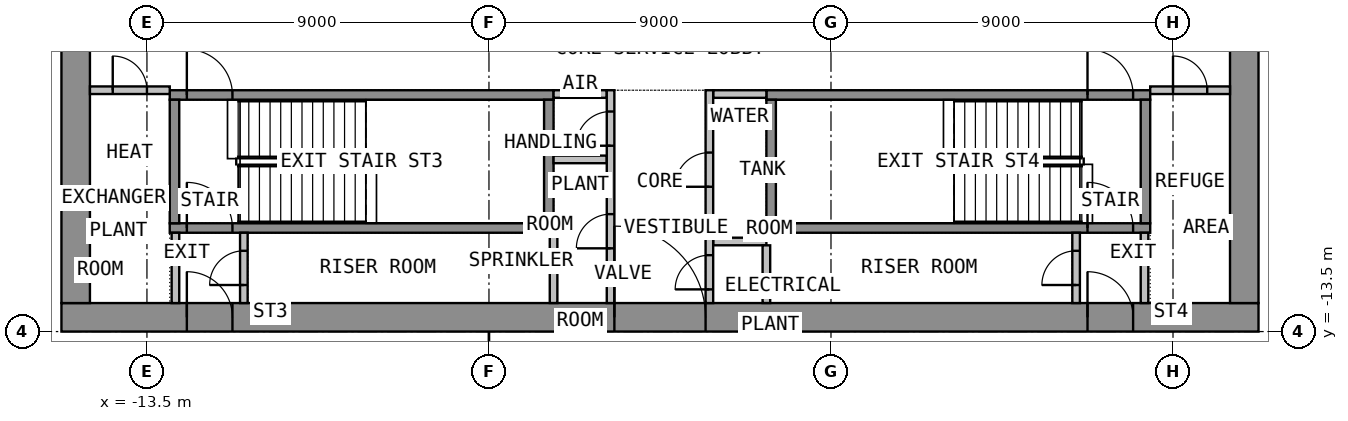
"""IFC4 building model, lengths in metres.
Left out: names, types, materials, properties, quantities, classifications, styles, units other than length and angle.
Written with IfcOpenShell. Run it as: python <this file> out.ifc"""

import sys

from ifc_helpers import new_model, si_unit, direction, frame, frame_2d, origin, place, context, subcontext, project, spatial, rectangle, extrude, element, fill, save


model = new_model("IFC4")
c1 = context("Model", 3, precision=1e-05, world=origin(), true_north=direction((0.0, 1.0)))
c2 = subcontext(c1, "Body", "Model", "MODEL_VIEW")
j1 = project(units=[si_unit("LENGTHUNIT", "METRE"), si_unit("PLANEANGLEUNIT", "RADIAN")], contexts=[c1])
p1 = place(None, origin())
s1 = spatial("IfcSite", under=j1, at=p1, CompositionType="ELEMENT")
p2 = place(p1, origin())
s2 = spatial("IfcBuilding", under=s1, at=p2, CompositionType="ELEMENT")
p3 = place(p2, frame((0.0, 0.0, 128.1)))
s3 = spatial("IfcBuildingStorey", under=s2, at=p3, CompositionType="ELEMENT", Elevation=128.1)
p4 = place(p3, frame((-15.75, -13.125, 0.0), z_axis=(0.0, 0.0, 1.0), x_axis=(1.0, 0.0, 0.0)))
e1 = element("IfcWall", 1, at=p4, inside=s3, PredefinedType="SHEAR", context=c2, shape_type="SweptSolid", body=[
    extrude(rectangle(XDim=31.5, YDim=0.75, at=frame_2d((15.75, 0.0))), origin(), (0.0, 0.0, 1.0), 4.175),
])
p5 = place(p4, frame((14.55, 0.0, 0.0)))
e2 = element("IfcOpeningElement", 2, at=p5, cuts=e1, PredefinedType="OPENING", context=c2, shape_type="SweptSolid", body=[
    extrude(rectangle(XDim=2.4, YDim=2.1, at=frame_2d((1.2, 1.05))), frame((0.0, 0.385, 0.0), z_axis=(0.0, -1.0, 0.0), x_axis=(1.0, 0.0, 0.0)), (0.0, 0.0, 1.0), 0.77),
])
p6 = place(p4, frame((3.3, 0.0, 0.0)))
e3 = element("IfcOpeningElement", 3, at=p6, cuts=e1, PredefinedType="OPENING", context=c2, shape_type="SweptSolid", body=[
    extrude(rectangle(XDim=1.2, YDim=2.1, at=frame_2d((0.6, 1.05))), frame((0.0, 0.385, 0.0), z_axis=(0.0, -1.0, 0.0), x_axis=(1.0, 0.0, 0.0)), (0.0, 0.0, 1.0), 0.77),
])
p7 = place(p4, frame((27.0, 0.0, 0.0)))
e4 = element("IfcOpeningElement", 4, at=p7, cuts=e1, PredefinedType="OPENING", context=c2, shape_type="SweptSolid", body=[
    extrude(rectangle(XDim=1.2, YDim=2.1, at=frame_2d((0.6, 1.05))), frame((0.0, 0.385, 0.0), z_axis=(0.0, -1.0, 0.0), x_axis=(1.0, 0.0, 0.0)), (0.0, 0.0, 1.0), 0.77),
])
p8 = place(p3, frame((-15.375, -12.75, 0.0), z_axis=(0.0, 0.0, 1.0), x_axis=(0.0, 1.0, 0.0)))
e5 = element("IfcWall", 5, at=p8, inside=s3, PredefinedType="SHEAR", context=c2, shape_type="SweptSolid", body=[
    extrude(rectangle(XDim=25.5, YDim=0.75, at=frame_2d((12.75, 0.0))), origin(), (0.0, 0.0, 1.0), 4.175),
])
p9 = place(p8, frame((11.55, 0.0, 0.0)))
e6 = element("IfcOpeningElement", 6, at=p9, cuts=e5, PredefinedType="OPENING", context=c2, shape_type="SweptSolid", body=[
    extrude(rectangle(XDim=2.4, YDim=2.1, at=frame_2d((1.2, 1.05))), frame((0.0, 0.385, 0.0), z_axis=(0.0, -1.0, 0.0), x_axis=(1.0, 0.0, 0.0)), (0.0, 0.0, 1.0), 0.77),
])
p10 = place(p3, frame((15.375, -12.75, 0.0), z_axis=(0.0, 0.0, 1.0), x_axis=(0.0, 1.0, 0.0)))
e7 = element("IfcWall", 7, at=p10, inside=s3, PredefinedType="SHEAR", context=c2, shape_type="SweptSolid", body=[
    extrude(rectangle(XDim=25.5, YDim=0.75, at=frame_2d((12.75, 0.0))), origin(), (0.0, 0.0, 1.0), 4.175),
])
p11 = place(p10, frame((11.55, 0.0, 0.0)))
e8 = element("IfcOpeningElement", 8, at=p11, cuts=e7, PredefinedType="OPENING", context=c2, shape_type="SweptSolid", body=[
    extrude(rectangle(XDim=2.4, YDim=2.1, at=frame_2d((1.2, 1.05))), frame((0.0, 0.385, 0.0), z_axis=(0.0, -1.0, 0.0), x_axis=(1.0, 0.0, 0.0)), (0.0, 0.0, 1.0), 0.77),
])
p12 = place(p3, frame((-12.9, -10.775, 0.0), z_axis=(0.0, 0.0, 1.0), x_axis=(1.0, 0.0, 0.0)))
e9 = element("IfcWall", 9, at=p12, inside=s3, PredefinedType="SHEAR", context=c2, shape_type="SweptSolid", body=[
    extrude(rectangle(XDim=10.1, YDim=0.25, at=frame_2d((5.05, 0.0))), origin(), (0.0, 0.0, 1.0), 4.175),
])
p13 = place(p12, frame((0.45, 0.0, 0.0)))
e10 = element("IfcOpeningElement", 10, at=p13, cuts=e9, PredefinedType="OPENING", context=c2, shape_type="SweptSolid", body=[
    extrude(rectangle(XDim=1.2, YDim=2.1, at=frame_2d((0.6, 1.05))), frame((0.0, 0.135, 0.0), z_axis=(0.0, -1.0, 0.0), x_axis=(1.0, 0.0, 0.0)), (0.0, 0.0, 1.0), 0.27),
])
p14 = place(p3, frame((-12.9, -7.275, 0.0), z_axis=(0.0, 0.0, 1.0), x_axis=(1.0, 0.0, 0.0)))
e11 = element("IfcWall", 11, at=p14, inside=s3, PredefinedType="SHEAR", context=c2, shape_type="SweptSolid", body=[
    extrude(rectangle(XDim=10.1, YDim=0.25, at=frame_2d((5.05, 0.0))), origin(), (0.0, 0.0, 1.0), 4.175),
])
p15 = place(p14, frame((0.45, 0.0, 0.0)))
e12 = element("IfcOpeningElement", 12, at=p15, cuts=e11, PredefinedType="OPENING", context=c2, shape_type="SweptSolid", body=[
    extrude(rectangle(XDim=1.2, YDim=2.1, at=frame_2d((0.6, 1.05))), frame((0.0, 0.135, 0.0), z_axis=(0.0, -1.0, 0.0), x_axis=(1.0, 0.0, 0.0)), (0.0, 0.0, 1.0), 0.27),
])
for number, where, z_axis, x_axis in (
    (13, (-12.775, -10.65, 0.0), (0.0, 0.0, 1.0), (0.0, 1.0, 0.0)),
    (14, (-2.925, -10.65, 0.0), (0.0, 0.0, 1.0), (0.0, 1.0, 0.0)),
):
    element("IfcWall", number, at=place(p3, frame(where, z_axis=z_axis, x_axis=x_axis)), inside=s3, PredefinedType="SHEAR", context=c2, shape_type="SweptSolid", body=[
        extrude(rectangle(XDim=3.25, YDim=0.25, at=frame_2d((1.625, 0.0))), origin(), (0.0, 0.0, 1.0), 4.175),
    ])
p16 = place(p3, frame((2.8, -10.775, 0.0), z_axis=(0.0, 0.0, 1.0), x_axis=(1.0, 0.0, 0.0)))
e15 = element("IfcWall", 15, at=p16, inside=s3, PredefinedType="SHEAR", context=c2, shape_type="SweptSolid", body=[
    extrude(rectangle(XDim=10.1, YDim=0.25, at=frame_2d((5.05, 0.0))), origin(), (0.0, 0.0, 1.0), 4.175),
])
p17 = place(p16, frame((8.45, 0.0, 0.0)))
e16 = element("IfcOpeningElement", 16, at=p17, cuts=e15, PredefinedType="OPENING", context=c2, shape_type="SweptSolid", body=[
    extrude(rectangle(XDim=1.2, YDim=2.1, at=frame_2d((0.6, 1.05))), frame((0.0, 0.135, 0.0), z_axis=(0.0, -1.0, 0.0), x_axis=(1.0, 0.0, 0.0)), (0.0, 0.0, 1.0), 0.27),
])
p18 = place(p3, frame((2.8, -7.275, 0.0), z_axis=(0.0, 0.0, 1.0), x_axis=(1.0, 0.0, 0.0)))
e17 = element("IfcWall", 17, at=p18, inside=s3, PredefinedType="SHEAR", context=c2, shape_type="SweptSolid", body=[
    extrude(rectangle(XDim=10.1, YDim=0.25, at=frame_2d((5.05, 0.0))), origin(), (0.0, 0.0, 1.0), 4.175),
])
p19 = place(p18, frame((8.45, 0.0, 0.0)))
e18 = element("IfcOpeningElement", 18, at=p19, cuts=e17, PredefinedType="OPENING", context=c2, shape_type="SweptSolid", body=[
    extrude(rectangle(XDim=1.2, YDim=2.1, at=frame_2d((0.6, 1.05))), frame((0.0, 0.135, 0.0), z_axis=(0.0, -1.0, 0.0), x_axis=(1.0, 0.0, 0.0)), (0.0, 0.0, 1.0), 0.27),
])
for number, where, z_axis, x_axis in (
    (19, (2.925, -10.65, 0.0), (0.0, 0.0, 1.0), (0.0, 1.0, 0.0)),
    (20, (12.775, -10.65, 0.0), (0.0, 0.0, 1.0), (0.0, 1.0, 0.0)),
):
    element("IfcWall", number, at=place(p3, frame(where, z_axis=z_axis, x_axis=x_axis)), inside=s3, PredefinedType="SHEAR", context=c2, shape_type="SweptSolid", body=[
        extrude(rectangle(XDim=3.25, YDim=0.25, at=frame_2d((1.625, 0.0))), origin(), (0.0, 0.0, 1.0), 4.175),
    ])
for number, where, z_axis, x_axis in (
    (21, (-2.8, -7.25, 0.0), (0.0, 0.0, 1.0), (1.0, 0.0, 0.0)),
    (22, (-2.8, -8.97, 0.0), (0.0, 0.0, 1.0), (1.0, 0.0, 0.0)),
    (23, (1.4, -7.25, 0.0), (0.0, 0.0, 1.0), (1.0, 0.0, 0.0)),
    (24, (1.4, -11.13, 0.0), (0.0, 0.0, 1.0), (1.0, 0.0, 0.0)),
):
    element("IfcWall", number, at=place(p3, frame(where, z_axis=z_axis, x_axis=x_axis)), inside=s3, PredefinedType="PARTITIONING", context=c2, shape_type="SweptSolid", body=[
        extrude(rectangle(XDim=1.4, YDim=0.2, at=frame_2d((0.7, 0.0))), origin(), (0.0, 0.0, 1.0), 4.175),
    ])
p20 = place(p3, frame((-1.3, -12.75, 0.0), z_axis=(0.0, 0.0, 1.0), x_axis=(0.0, 1.0, 0.0)))
e25 = element("IfcWall", 25, at=p20, inside=s3, PredefinedType="PARTITIONING", context=c2, shape_type="SweptSolid", body=[
    extrude(rectangle(XDim=5.6, YDim=0.2, at=frame_2d((2.8, 0.0))), origin(), (0.0, 0.0, 1.0), 4.175),
])
p21 = place(p20, frame((1.44, 0.0, 0.0)))
e26 = element("IfcOpeningElement", 26, at=p21, cuts=e25, PredefinedType="OPENING", context=c2, shape_type="SweptSolid", body=[
    extrude(rectangle(XDim=0.9, YDim=2.1, at=frame_2d((0.45, 1.05))), frame((0.0, 0.11, 0.0), z_axis=(0.0, -1.0, 0.0), x_axis=(1.0, 0.0, 0.0)), (0.0, 0.0, 1.0), 0.22),
])
p22 = place(p20, frame((4.14, 0.0, 0.0)))
e27 = element("IfcOpeningElement", 27, at=p22, cuts=e25, PredefinedType="OPENING", context=c2, shape_type="SweptSolid", body=[
    extrude(rectangle(XDim=0.9, YDim=2.1, at=frame_2d((0.45, 1.05))), frame((0.0, 0.11, 0.0), z_axis=(0.0, -1.0, 0.0), x_axis=(1.0, 0.0, 0.0)), (0.0, 0.0, 1.0), 0.22),
])
p23 = place(p3, frame((1.3, -12.75, 0.0), z_axis=(0.0, 0.0, 1.0), x_axis=(0.0, 1.0, 0.0)))
e28 = element("IfcWall", 28, at=p23, inside=s3, PredefinedType="PARTITIONING", context=c2, shape_type="SweptSolid", body=[
    extrude(rectangle(XDim=5.6, YDim=0.2, at=frame_2d((2.8, 0.0))), origin(), (0.0, 0.0, 1.0), 4.175),
])
p24 = place(p23, frame((0.36, 0.0, 0.0)))
e29 = element("IfcOpeningElement", 29, at=p24, cuts=e28, PredefinedType="OPENING", context=c2, shape_type="SweptSolid", body=[
    extrude(rectangle(XDim=0.9, YDim=2.1, at=frame_2d((0.45, 1.05))), frame((0.0, 0.11, 0.0), z_axis=(0.0, -1.0, 0.0), x_axis=(1.0, 0.0, 0.0)), (0.0, 0.0, 1.0), 0.22),
])
p25 = place(p23, frame((3.06, 0.0, 0.0)))
e30 = element("IfcOpeningElement", 30, at=p25, cuts=e28, PredefinedType="OPENING", context=c2, shape_type="SweptSolid", body=[
    extrude(rectangle(XDim=0.9, YDim=2.1, at=frame_2d((0.45, 1.05))), frame((0.0, 0.11, 0.0), z_axis=(0.0, -1.0, 0.0), x_axis=(1.0, 0.0, 0.0)), (0.0, 0.0, 1.0), 0.22),
])
p26 = place(p3, frame((-12.75, -12.75, 0.0), z_axis=(0.0, 0.0, 1.0), x_axis=(0.0, 1.0, 0.0)))
e31 = element("IfcWall", 31, at=p26, inside=s3, PredefinedType="PARTITIONING", context=c2, shape_type="SweptSolid", body=[
    extrude(rectangle(XDim=1.85, YDim=0.2, at=frame_2d((0.925, 0.0))), origin(), (0.0, 0.0, 1.0), 4.175),
])
p27 = place(p3, frame((-10.95, -12.75, 0.0), z_axis=(0.0, 0.0, 1.0), x_axis=(0.0, 1.0, 0.0)))
e32 = element("IfcWall", 32, at=p27, inside=s3, PredefinedType="PARTITIONING", context=c2, shape_type="SweptSolid", body=[
    extrude(rectangle(XDim=1.85, YDim=0.2, at=frame_2d((0.925, 0.0))), origin(), (0.0, 0.0, 1.0), 4.175),
])
p28 = place(p27, frame((0.475, 0.0, 0.0)))
e33 = element("IfcOpeningElement", 33, at=p28, cuts=e32, PredefinedType="OPENING", context=c2, shape_type="SweptSolid", body=[
    extrude(rectangle(XDim=0.9, YDim=2.1, at=frame_2d((0.45, 1.05))), frame((0.0, 0.11, 0.0), z_axis=(0.0, -1.0, 0.0), x_axis=(1.0, 0.0, 0.0)), (0.0, 0.0, 1.0), 0.22),
])
p29 = place(p3, frame((12.75, -12.75, 0.0), z_axis=(0.0, 0.0, 1.0), x_axis=(0.0, 1.0, 0.0)))
e34 = element("IfcWall", 34, at=p29, inside=s3, PredefinedType="PARTITIONING", context=c2, shape_type="SweptSolid", body=[
    extrude(rectangle(XDim=1.85, YDim=0.2, at=frame_2d((0.925, 0.0))), origin(), (0.0, 0.0, 1.0), 4.175),
])
p30 = place(p3, frame((10.95, -12.75, 0.0), z_axis=(0.0, 0.0, 1.0), x_axis=(0.0, 1.0, 0.0)))
e35 = element("IfcWall", 35, at=p30, inside=s3, PredefinedType="PARTITIONING", context=c2, shape_type="SweptSolid", body=[
    extrude(rectangle(XDim=1.85, YDim=0.2, at=frame_2d((0.925, 0.0))), origin(), (0.0, 0.0, 1.0), 4.175),
])
p31 = place(p30, frame((0.475, 0.0, 0.0)))
e36 = element("IfcOpeningElement", 36, at=p31, cuts=e35, PredefinedType="OPENING", context=c2, shape_type="SweptSolid", body=[
    extrude(rectangle(XDim=0.9, YDim=2.1, at=frame_2d((0.45, 1.05))), frame((0.0, 0.11, 0.0), z_axis=(0.0, -1.0, 0.0), x_axis=(1.0, 0.0, 0.0)), (0.0, 0.0, 1.0), 0.22),
])
p32 = place(p3, frame((-15.0, -7.15, 0.0), z_axis=(0.0, 0.0, 1.0), x_axis=(1.0, 0.0, 0.0)))
e37 = element("IfcWall", 37, at=p32, inside=s3, PredefinedType="PARTITIONING", context=c2, shape_type="SweptSolid", body=[
    extrude(rectangle(XDim=2.1, YDim=0.2, at=frame_2d((1.05, 0.0))), origin(), (0.0, 0.0, 1.0), 4.175),
])
p33 = place(p32, frame((0.6, 0.0, 0.0)))
e38 = element("IfcOpeningElement", 38, at=p33, cuts=e37, PredefinedType="OPENING", context=c2, shape_type="SweptSolid", body=[
    extrude(rectangle(XDim=0.9, YDim=2.1, at=frame_2d((0.45, 1.05))), frame((0.0, 0.11, 0.0), z_axis=(0.0, -1.0, 0.0), x_axis=(1.0, 0.0, 0.0)), (0.0, 0.0, 1.0), 0.22),
])
p34 = place(p3, frame((12.9, -7.15, 0.0), z_axis=(0.0, 0.0, 1.0), x_axis=(1.0, 0.0, 0.0)))
e39 = element("IfcWall", 39, at=p34, inside=s3, PredefinedType="PARTITIONING", context=c2, shape_type="SweptSolid", body=[
    extrude(rectangle(XDim=2.1, YDim=0.2, at=frame_2d((1.05, 0.0))), origin(), (0.0, 0.0, 1.0), 4.175),
])
p35 = place(p34, frame((0.6, 0.0, 0.0)))
e40 = element("IfcOpeningElement", 40, at=p35, cuts=e39, PredefinedType="OPENING", context=c2, shape_type="SweptSolid", body=[
    extrude(rectangle(XDim=0.9, YDim=2.1, at=frame_2d((0.45, 1.05))), frame((0.0, 0.11, 0.0), z_axis=(0.0, -1.0, 0.0), x_axis=(1.0, 0.0, 0.0)), (0.0, 0.0, 1.0), 0.22),
])
p36 = place(p3, frame((-2.8, -12.749, 0.0), z_axis=(0.0, 0.0, 1.0), x_axis=(0.0, 1.0, 0.0)))
e41 = element("IfcWall", 41, at=p36, inside=s3, PredefinedType="PARTITIONING", context=c2, shape_type="SweptSolid", body=[
    extrude(rectangle(XDim=1.848, YDim=0.2, at=frame_2d((0.924, 0.0))), origin(), (0.0, 0.0, 1.0), 4.175),
])
p37 = place(p3, frame((2.8, -11.231, 0.0), z_axis=(0.0, 0.0, 1.0), x_axis=(0.0, -1.0, 0.0)))
e42 = element("IfcWall", 42, at=p37, inside=s3, PredefinedType="PARTITIONING", context=c2, shape_type="SweptSolid", body=[
    extrude(rectangle(XDim=1.518, YDim=0.2, at=frame_2d((0.759, 0.0))), origin(), (0.0, 0.0, 1.0), 4.175),
])
p38 = place(p5, origin())
e43 = element("IfcDoor", 43, at=p38, inside=s3, OperationType="DOUBLE_DOOR_DOUBLE_SWING", PredefinedType="DOOR", context=c2, shape_type="SweptSolid", body=[
    extrude(rectangle(XDim=2.4, YDim=2.1, at=frame_2d((1.2, 1.05))), frame((0.0, 0.025, 0.0), z_axis=(0.0, -1.0, 0.0), x_axis=(1.0, 0.0, 0.0)), (0.0, 0.0, 1.0), 0.05),
])
fill(e2, e43)
p39 = place(p6, origin())
e44 = element("IfcDoor", 44, at=p39, inside=s3, OperationType="SINGLE_SWING_RIGHT", PredefinedType="DOOR", context=c2, shape_type="SweptSolid", body=[
    extrude(rectangle(XDim=1.2, YDim=2.1, at=frame_2d((0.6, 1.05))), frame((0.0, 0.025, 0.0), z_axis=(0.0, -1.0, 0.0), x_axis=(1.0, 0.0, 0.0)), (0.0, 0.0, 1.0), 0.05),
])
fill(e3, e44)
p40 = place(p7, origin())
e45 = element("IfcDoor", 45, at=p40, inside=s3, OperationType="SINGLE_SWING_RIGHT", PredefinedType="DOOR", context=c2, shape_type="SweptSolid", body=[
    extrude(rectangle(XDim=1.2, YDim=2.1, at=frame_2d((0.6, 1.05))), frame((0.0, 0.025, 0.0), z_axis=(0.0, -1.0, 0.0), x_axis=(1.0, 0.0, 0.0)), (0.0, 0.0, 1.0), 0.05),
])
fill(e4, e45)
p41 = place(p15, origin())
e46 = element("IfcDoor", 46, at=p41, inside=s3, OperationType="SINGLE_SWING_LEFT", PredefinedType="DOOR", context=c2, shape_type="SweptSolid", body=[
    extrude(rectangle(XDim=1.2, YDim=2.1, at=frame_2d((0.6, 1.05))), frame((0.0, 0.025, 0.0), z_axis=(0.0, -1.0, 0.0), x_axis=(1.0, 0.0, 0.0)), (0.0, 0.0, 1.0), 0.05),
])
fill(e12, e46)
p42 = place(p19, origin())
e47 = element("IfcDoor", 47, at=p42, inside=s3, OperationType="SINGLE_SWING_LEFT", PredefinedType="DOOR", context=c2, shape_type="SweptSolid", body=[
    extrude(rectangle(XDim=1.2, YDim=2.1, at=frame_2d((0.6, 1.05))), frame((0.0, 0.025, 0.0), z_axis=(0.0, -1.0, 0.0), x_axis=(1.0, 0.0, 0.0)), (0.0, 0.0, 1.0), 0.05),
])
fill(e18, e47)
p43 = place(p21, origin())
e48 = element("IfcDoor", 48, at=p43, inside=s3, OperationType="SINGLE_SWING_LEFT", PredefinedType="DOOR", context=c2, shape_type="SweptSolid", body=[
    extrude(rectangle(XDim=0.9, YDim=2.1, at=frame_2d((0.45, 1.05))), frame((0.0, 0.025, 0.0), z_axis=(0.0, -1.0, 0.0), x_axis=(1.0, 0.0, 0.0)), (0.0, 0.0, 1.0), 0.05),
])
fill(e26, e48)
p44 = place(p22, origin())
e49 = element("IfcDoor", 49, at=p44, inside=s3, OperationType="SINGLE_SWING_LEFT", PredefinedType="DOOR", context=c2, shape_type="SweptSolid", body=[
    extrude(rectangle(XDim=0.9, YDim=2.1, at=frame_2d((0.45, 1.05))), frame((0.0, 0.025, 0.0), z_axis=(0.0, -1.0, 0.0), x_axis=(1.0, 0.0, 0.0)), (0.0, 0.0, 1.0), 0.05),
])
fill(e27, e49)
p45 = place(p24, origin())
e50 = element("IfcDoor", 50, at=p45, inside=s3, OperationType="SINGLE_SWING_LEFT", PredefinedType="DOOR", context=c2, shape_type="SweptSolid", body=[
    extrude(rectangle(XDim=0.9, YDim=2.1, at=frame_2d((0.45, 1.05))), frame((0.0, 0.025, 0.0), z_axis=(0.0, -1.0, 0.0), x_axis=(1.0, 0.0, 0.0)), (0.0, 0.0, 1.0), 0.05),
])
fill(e29, e50)
p46 = place(p25, origin())
e51 = element("IfcDoor", 51, at=p46, inside=s3, OperationType="SINGLE_SWING_LEFT", PredefinedType="DOOR", context=c2, shape_type="SweptSolid", body=[
    extrude(rectangle(XDim=0.9, YDim=2.1, at=frame_2d((0.45, 1.05))), frame((0.0, 0.025, 0.0), z_axis=(0.0, -1.0, 0.0), x_axis=(1.0, 0.0, 0.0)), (0.0, 0.0, 1.0), 0.05),
])
fill(e30, e51)
p47 = place(p13, origin())
e52 = element("IfcDoor", 52, at=p47, inside=s3, OperationType="SINGLE_SWING_RIGHT", PredefinedType="DOOR", context=c2, shape_type="SweptSolid", body=[
    extrude(rectangle(XDim=1.2, YDim=2.1, at=frame_2d((0.6, 1.05))), frame((0.0, 0.025, 0.0), z_axis=(0.0, -1.0, 0.0), x_axis=(1.0, 0.0, 0.0)), (0.0, 0.0, 1.0), 0.05),
])
fill(e10, e52)
p48 = place(p28, origin())
e53 = element("IfcDoor", 53, at=p48, inside=s3, OperationType="SINGLE_SWING_LEFT", PredefinedType="DOOR", context=c2, shape_type="SweptSolid", body=[
    extrude(rectangle(XDim=0.9, YDim=2.1, at=frame_2d((0.45, 1.05))), frame((0.0, 0.025, 0.0), z_axis=(0.0, -1.0, 0.0), x_axis=(1.0, 0.0, 0.0)), (0.0, 0.0, 1.0), 0.05),
])
fill(e33, e53)
p49 = place(p17, origin())
e54 = element("IfcDoor", 54, at=p49, inside=s3, OperationType="SINGLE_SWING_RIGHT", PredefinedType="DOOR", context=c2, shape_type="SweptSolid", body=[
    extrude(rectangle(XDim=1.2, YDim=2.1, at=frame_2d((0.6, 1.05))), frame((0.0, 0.025, 0.0), z_axis=(0.0, -1.0, 0.0), x_axis=(1.0, 0.0, 0.0)), (0.0, 0.0, 1.0), 0.05),
])
fill(e16, e54)
p50 = place(p31, origin())
e55 = element("IfcDoor", 55, at=p50, inside=s3, OperationType="SINGLE_SWING_LEFT", PredefinedType="DOOR", context=c2, shape_type="SweptSolid", body=[
    extrude(rectangle(XDim=0.9, YDim=2.1, at=frame_2d((0.45, 1.05))), frame((0.0, 0.025, 0.0), z_axis=(0.0, -1.0, 0.0), x_axis=(1.0, 0.0, 0.0)), (0.0, 0.0, 1.0), 0.05),
])
fill(e36, e55)
p51 = place(p33, origin())
e56 = element("IfcDoor", 56, at=p51, inside=s3, OperationType="SINGLE_SWING_LEFT", PredefinedType="DOOR", context=c2, shape_type="SweptSolid", body=[
    extrude(rectangle(XDim=0.9, YDim=2.1, at=frame_2d((0.45, 1.05))), frame((0.0, 0.025, 0.0), z_axis=(0.0, -1.0, 0.0), x_axis=(1.0, 0.0, 0.0)), (0.0, 0.0, 1.0), 0.05),
])
fill(e38, e56)
p52 = place(p35, origin())
e57 = element("IfcDoor", 57, at=p52, inside=s3, OperationType="SINGLE_SWING_LEFT", PredefinedType="DOOR", context=c2, shape_type="SweptSolid", body=[
    extrude(rectangle(XDim=0.9, YDim=2.1, at=frame_2d((0.45, 1.05))), frame((0.0, 0.025, 0.0), z_axis=(0.0, -1.0, 0.0), x_axis=(1.0, 0.0, 0.0)), (0.0, 0.0, 1.0), 0.05),
])
fill(e40, e57)
save(model, sys.argv[1])
